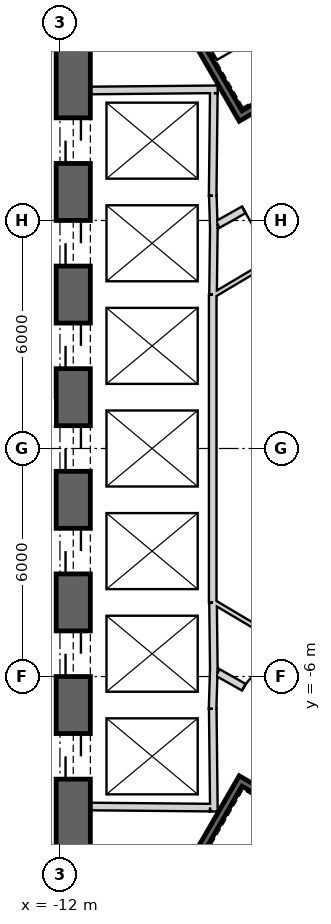
"""IFC4 building model, lengths in metres.
Left out: names, types, materials, properties, quantities, classifications, styles, units other than length and angle.
Written with IfcOpenShell. Run it as: python <this file> out.ifc"""

import sys

from ifc_helpers import new_model, si_unit, direction, frame, frame_2d, origin, place, context, subcontext, project, spatial, rectangle, extrude, element, fill, save


model = new_model("IFC4")
c1 = context("Model", 3, precision=1e-05, world=origin(), true_north=direction((0.0, 1.0)))
c2 = subcontext(c1, "Body", "Model", "MODEL_VIEW")
j1 = project(units=[si_unit("LENGTHUNIT", "METRE"), si_unit("PLANEANGLEUNIT", "RADIAN")], contexts=[c1])
p1 = place(None, origin())
s1 = spatial("IfcSite", under=j1, at=p1, CompositionType="ELEMENT")
p2 = place(p1, origin())
s2 = spatial("IfcBuilding", under=s1, at=p2, CompositionType="ELEMENT")
p3 = place(p2, frame((0.0, 0.0, 322.1)))
s3 = spatial("IfcBuildingStorey", under=s2, at=p3, CompositionType="ELEMENT", Elevation=322.1)
p4 = place(p3, frame((19.475, 2.208, 0.0), z_axis=(0.0, 0.0, 1.0), x_axis=(-0.866028369851, 0.499994862586, 0.0)))
e1 = element("IfcWall", 1, at=p4, inside=s3, PredefinedType="SHEAR", context=c2, shape_type="SweptSolid", body=[
    extrude(rectangle(XDim=31.523, YDim=0.9, at=frame_2d((15.762, 0.0))), origin(), (0.0, 0.0, 1.0), 3.9),
])
p5 = place(p4, frame((7.062, 0.0, 0.0)))
e2 = element("IfcOpeningElement", 2, at=p5, cuts=e1, PredefinedType="OPENING", context=c2, shape_type="SweptSolid", body=[
    extrude(rectangle(XDim=1.2, YDim=2.4, at=frame_2d((0.6, 1.2))), frame((0.0, 0.46, 0.0), z_axis=(0.0, -1.0, 0.0), x_axis=(1.0, 0.0, 0.0)), (0.0, 0.0, 1.0), 0.92),
])
p6 = place(p4, frame((3.612, 0.0, 0.0)))
e3 = element("IfcOpeningElement", 3, at=p6, cuts=e1, PredefinedType="OPENING", context=c2, shape_type="SweptSolid", body=[
    extrude(rectangle(XDim=1.2, YDim=2.4, at=frame_2d((0.6, 1.2))), frame((0.0, 0.46, 0.0), z_axis=(0.0, -1.0, 0.0), x_axis=(1.0, 0.0, 0.0)), (0.0, 0.0, 1.0), 0.92),
])
p7 = place(p4, frame((26.712, 0.0, 0.0)))
e4 = element("IfcOpeningElement", 4, at=p7, cuts=e1, PredefinedType="OPENING", context=c2, shape_type="SweptSolid", body=[
    extrude(rectangle(XDim=1.2, YDim=2.4, at=frame_2d((0.6, 1.2))), frame((0.0, 0.46, 0.0), z_axis=(0.0, -1.0, 0.0), x_axis=(1.0, 0.0, 0.0)), (0.0, 0.0, 1.0), 0.92),
])
p8 = place(p3, frame((-11.65, 15.762, 0.0), z_axis=(0.0, 0.0, 1.0), x_axis=(0.0, -1.0, 0.0)))
e5 = element("IfcWall", 5, at=p8, inside=s3, PredefinedType="SHEAR", context=c2, shape_type="SweptSolid", body=[
    extrude(rectangle(XDim=31.523, YDim=0.9, at=frame_2d((15.762, 0.0))), origin(), (0.0, 0.0, 1.0), 3.9),
])
p9 = place(p8, frame((7.062, 0.0, 0.0)))
e6 = element("IfcOpeningElement", 6, at=p9, cuts=e5, PredefinedType="OPENING", context=c2, shape_type="SweptSolid", body=[
    extrude(rectangle(XDim=1.2, YDim=2.4, at=frame_2d((0.6, 1.2))), frame((0.0, 0.46, 0.0), z_axis=(0.0, -1.0, 0.0), x_axis=(1.0, 0.0, 0.0)), (0.0, 0.0, 1.0), 0.92),
])
p10 = place(p8, frame((9.762, 0.0, 0.0)))
e7 = element("IfcOpeningElement", 7, at=p10, cuts=e5, PredefinedType="OPENING", context=c2, shape_type="SweptSolid", body=[
    extrude(rectangle(XDim=1.2, YDim=2.4, at=frame_2d((0.6, 1.2))), frame((0.0, 0.46, 0.0), z_axis=(0.0, -1.0, 0.0), x_axis=(1.0, 0.0, 0.0)), (0.0, 0.0, 1.0), 0.92),
])
p11 = place(p8, frame((12.462, 0.0, 0.0)))
e8 = element("IfcOpeningElement", 8, at=p11, cuts=e5, PredefinedType="OPENING", context=c2, shape_type="SweptSolid", body=[
    extrude(rectangle(XDim=1.2, YDim=2.4, at=frame_2d((0.6, 1.2))), frame((0.0, 0.46, 0.0), z_axis=(0.0, -1.0, 0.0), x_axis=(1.0, 0.0, 0.0)), (0.0, 0.0, 1.0), 0.92),
])
p12 = place(p8, frame((15.162, 0.0, 0.0)))
e9 = element("IfcOpeningElement", 9, at=p12, cuts=e5, PredefinedType="OPENING", context=c2, shape_type="SweptSolid", body=[
    extrude(rectangle(XDim=1.2, YDim=2.4, at=frame_2d((0.6, 1.2))), frame((0.0, 0.46, 0.0), z_axis=(0.0, -1.0, 0.0), x_axis=(1.0, 0.0, 0.0)), (0.0, 0.0, 1.0), 0.92),
])
p13 = place(p8, frame((17.862, 0.0, 0.0)))
e10 = element("IfcOpeningElement", 10, at=p13, cuts=e5, PredefinedType="OPENING", context=c2, shape_type="SweptSolid", body=[
    extrude(rectangle(XDim=1.2, YDim=2.4, at=frame_2d((0.6, 1.2))), frame((0.0, 0.46, 0.0), z_axis=(0.0, -1.0, 0.0), x_axis=(1.0, 0.0, 0.0)), (0.0, 0.0, 1.0), 0.92),
])
p14 = place(p8, frame((20.562, 0.0, 0.0)))
e11 = element("IfcOpeningElement", 11, at=p14, cuts=e5, PredefinedType="OPENING", context=c2, shape_type="SweptSolid", body=[
    extrude(rectangle(XDim=1.2, YDim=2.4, at=frame_2d((0.6, 1.2))), frame((0.0, 0.46, 0.0), z_axis=(0.0, -1.0, 0.0), x_axis=(1.0, 0.0, 0.0)), (0.0, 0.0, 1.0), 0.92),
])
p15 = place(p8, frame((23.262, 0.0, 0.0)))
e12 = element("IfcOpeningElement", 12, at=p15, cuts=e5, PredefinedType="OPENING", context=c2, shape_type="SweptSolid", body=[
    extrude(rectangle(XDim=1.2, YDim=2.4, at=frame_2d((0.6, 1.2))), frame((0.0, 0.46, 0.0), z_axis=(0.0, -1.0, 0.0), x_axis=(1.0, 0.0, 0.0)), (0.0, 0.0, 1.0), 0.92),
])
p16 = place(p8, frame((3.612, 0.0, 0.0)))
e13 = element("IfcOpeningElement", 13, at=p16, cuts=e5, PredefinedType="OPENING", context=c2, shape_type="SweptSolid", body=[
    extrude(rectangle(XDim=1.2, YDim=2.4, at=frame_2d((0.6, 1.2))), frame((0.0, 0.46, 0.0), z_axis=(0.0, -1.0, 0.0), x_axis=(1.0, 0.0, 0.0)), (0.0, 0.0, 1.0), 0.92),
])
p17 = place(p8, frame((26.712, 0.0, 0.0)))
e14 = element("IfcOpeningElement", 14, at=p17, cuts=e5, PredefinedType="OPENING", context=c2, shape_type="SweptSolid", body=[
    extrude(rectangle(XDim=1.2, YDim=2.4, at=frame_2d((0.6, 1.2))), frame((0.0, 0.46, 0.0), z_axis=(0.0, -1.0, 0.0), x_axis=(1.0, 0.0, 0.0)), (0.0, 0.0, 1.0), 0.92),
])
p18 = place(p3, frame((-7.825, -17.97, 0.0), z_axis=(0.0, 0.0, 1.0), x_axis=(0.866028369851, 0.499994862586, 0.0)))
e15 = element("IfcWall", 15, at=p18, inside=s3, PredefinedType="SHEAR", context=c2, shape_type="SweptSolid", body=[
    extrude(rectangle(XDim=31.523, YDim=0.9, at=frame_2d((15.762, 0.0))), origin(), (0.0, 0.0, 1.0), 3.9),
])
p19 = place(p18, frame((17.862, 0.0, 0.0)))
e16 = element("IfcOpeningElement", 16, at=p19, cuts=e15, PredefinedType="OPENING", context=c2, shape_type="SweptSolid", body=[
    extrude(rectangle(XDim=1.2, YDim=2.4, at=frame_2d((0.6, 1.2))), frame((0.0, 0.46, 0.0), z_axis=(0.0, -1.0, 0.0), x_axis=(1.0, 0.0, 0.0)), (0.0, 0.0, 1.0), 0.92),
])
p20 = place(p18, frame((20.562, 0.0, 0.0)))
e17 = element("IfcOpeningElement", 17, at=p20, cuts=e15, PredefinedType="OPENING", context=c2, shape_type="SweptSolid", body=[
    extrude(rectangle(XDim=1.2, YDim=2.4, at=frame_2d((0.6, 1.2))), frame((0.0, 0.46, 0.0), z_axis=(0.0, -1.0, 0.0), x_axis=(1.0, 0.0, 0.0)), (0.0, 0.0, 1.0), 0.92),
])
p21 = place(p18, frame((26.712, 0.0, 0.0)))
e18 = element("IfcOpeningElement", 18, at=p21, cuts=e15, PredefinedType="OPENING", context=c2, shape_type="SweptSolid", body=[
    extrude(rectangle(XDim=1.2, YDim=2.4, at=frame_2d((0.6, 1.2))), frame((0.0, 0.46, 0.0), z_axis=(0.0, -1.0, 0.0), x_axis=(1.0, 0.0, 0.0)), (0.0, 0.0, 1.0), 0.92),
])
p22 = place(p18, frame((3.612, 0.0, 0.0)))
e19 = element("IfcOpeningElement", 19, at=p22, cuts=e15, PredefinedType="OPENING", context=c2, shape_type="SweptSolid", body=[
    extrude(rectangle(XDim=1.2, YDim=2.4, at=frame_2d((0.6, 1.2))), frame((0.0, 0.46, 0.0), z_axis=(0.0, -1.0, 0.0), x_axis=(1.0, 0.0, 0.0)), (0.0, 0.0, 1.0), 0.92),
])
p23 = place(p3, frame((-11.2, 9.42, 0.0), z_axis=(0.0, 0.0, 1.0), x_axis=(0.999957167047, 0.009255488683, 0.0)))
e20 = element("IfcWall", 20, at=p23, inside=s3, PredefinedType="PLUMBINGWALL", context=c2, shape_type="SweptSolid", body=[
    extrude(rectangle(XDim=3.35, YDim=0.2, at=frame_2d((1.675, 0.0))), origin(), (0.0, 0.0, 1.0), 3.6),
])
p24 = place(p3, frame((-7.951, 9.35, 0.0), z_axis=(0.0, 0.0, 1.0), x_axis=(-0.011120469654, -0.999938165666, 0.0)))
e21 = element("IfcWall", 21, at=p24, inside=s3, PredefinedType="PLUMBINGWALL", context=c2, shape_type="SweptSolid", body=[
    extrude(rectangle(XDim=2.7, YDim=0.2, at=frame_2d((1.35, 0.0))), origin(), (0.0, 0.0, 1.0), 3.6),
])
p25 = place(p3, frame((-7.977, 6.65, 0.0), z_axis=(0.0, 0.0, 1.0), x_axis=(0.030861509705, -0.999523670164, 0.0)))
e22 = element("IfcWall", 22, at=p25, inside=s3, PredefinedType="PLUMBINGWALL", context=c2, shape_type="SweptSolid", body=[
    extrude(rectangle(XDim=0.878, YDim=0.2, at=frame_2d((0.439, 0.0))), origin(), (0.0, 0.0, 1.0), 3.6),
])
p26 = place(p3, frame((-7.949, 5.895, 0.0), z_axis=(0.0, 0.0, 1.0), x_axis=(-0.012042535896, -0.999927486035, 0.0)))
e23 = element("IfcWall", 23, at=p26, inside=s3, PredefinedType="PLUMBINGWALL", context=c2, shape_type="SweptSolid", body=[
    extrude(rectangle(XDim=1.845, YDim=0.2, at=frame_2d((0.922, 0.0))), origin(), (0.0, 0.0, 1.0), 3.6),
])
p27 = place(p3, frame((-7.98, 4.05, 0.0), z_axis=(0.0, 0.0, 1.0), x_axis=(0.0, -1.0, 0.0)))
e24 = element("IfcWall", 24, at=p27, inside=s3, PredefinedType="PLUMBINGWALL", context=c2, shape_type="SweptSolid", body=[
    extrude(rectangle(XDim=8.1, YDim=0.2, at=frame_2d((4.05, 0.0))), origin(), (0.0, 0.0, 1.0), 3.6),
])
p28 = place(p3, frame((-7.95, -5.772, 0.0), z_axis=(0.0, 0.0, 1.0), x_axis=(-0.030803413295, -0.999525462272, 0.0)))
e25 = element("IfcWall", 25, at=p28, inside=s3, PredefinedType="PLUMBINGWALL", context=c2, shape_type="SweptSolid", body=[
    extrude(rectangle(XDim=1.078, YDim=0.2, at=frame_2d((0.539, 0.0))), origin(), (0.0, 0.0, 1.0), 3.6),
])
p29 = place(p3, frame((-7.971, -4.05, 0.0), z_axis=(0.0, 0.0, 1.0), x_axis=(0.012042535896, -0.999927486035, 0.0)))
e26 = element("IfcWall", 26, at=p29, inside=s3, PredefinedType="PLUMBINGWALL", context=c2, shape_type="SweptSolid", body=[
    extrude(rectangle(XDim=1.845, YDim=0.2, at=frame_2d((0.922, 0.0))), origin(), (0.0, 0.0, 1.0), 3.6),
])
p30 = place(p3, frame((-7.979, -6.85, 0.0), z_axis=(0.0, 0.0, 1.0), x_axis=(0.011121475088, -0.999938154483, 0.0)))
e27 = element("IfcWall", 27, at=p30, inside=s3, PredefinedType="PLUMBINGWALL", context=c2, shape_type="SweptSolid", body=[
    extrude(rectangle(XDim=2.7, YDim=0.2, at=frame_2d((1.35, 0.0))), origin(), (0.0, 0.0, 1.0), 3.6),
])
p31 = place(p3, frame((-8.05, -9.449, 0.0), z_axis=(0.0, 0.0, 1.0), x_axis=(-0.999957467379, 0.009222983926, 0.0)))
e28 = element("IfcWall", 28, at=p31, inside=s3, PredefinedType="PLUMBINGWALL", context=c2, shape_type="SweptSolid", body=[
    extrude(rectangle(XDim=3.15, YDim=0.2, at=frame_2d((1.575, 0.0))), origin(), (0.0, 0.0, 1.0), 3.6),
])
p32 = place(p3, frame((-11.245, 15.678, -0.3), z_axis=(0.0, 0.0, 1.0), x_axis=(0.499977274689, -0.866038523851, 0.0)))
e29 = element("IfcWall", 29, at=p32, inside=s3, PredefinedType="SHEAR", context=c2, shape_type="SweptSolid", body=[
    extrude(rectangle(XDim=8.1, YDim=0.2, at=frame_2d((4.05, 0.0))), origin(), (0.0, 0.0, 1.0), 3.9),
])
p33 = place(p3, frame((-7.159, 8.8, -0.3), z_axis=(0.0, 0.0, 1.0), x_axis=(0.866047807691, 0.499961193289, 0.0)))
e30 = element("IfcWall", 30, at=p33, inside=s3, PredefinedType="SHEAR", context=c2, shape_type="SweptSolid", body=[
    extrude(rectangle(XDim=3.6, YDim=0.2, at=frame_2d((1.8, 0.0))), origin(), (0.0, 0.0, 1.0), 3.9),
])
p34 = place(p33, frame((1.25, 0.0, 0.3)))
e31 = element("IfcOpeningElement", 31, at=p34, cuts=e30, PredefinedType="OPENING", context=c2, shape_type="SweptSolid", body=[
    extrude(rectangle(XDim=1.1, YDim=2.1, at=frame_2d((0.55, 1.05))), frame((0.0, 0.11, 0.0), z_axis=(0.0, -1.0, 0.0), x_axis=(1.0, 0.0, 0.0)), (0.0, 0.0, 1.0), 0.22),
])
p35 = place(p3, frame((-7.196, -8.663, -0.3), z_axis=(0.0, 0.0, 1.0), x_axis=(-0.499997992926, -0.866026562566, 0.0)))
e32 = element("IfcWall", 32, at=p35, inside=s3, PredefinedType="SHEAR", context=c2, shape_type="SweptSolid", body=[
    extrude(rectangle(XDim=7.9, YDim=0.2, at=frame_2d((3.95, 0.0))), origin(), (0.0, 0.0, 1.0), 3.9),
])
p36 = place(p3, frame((-4.041, -10.599, -0.3), z_axis=(0.0, 0.0, 1.0), x_axis=(-0.866047807691, 0.499961193289, 0.0)))
e33 = element("IfcWall", 33, at=p36, inside=s3, PredefinedType="SHEAR", context=c2, shape_type="SweptSolid", body=[
    extrude(rectangle(XDim=3.6, YDim=0.2, at=frame_2d((1.8, 0.0))), origin(), (0.0, 0.0, 1.0), 3.9),
])
p37 = place(p36, frame((1.25, 0.0, 0.3)))
e34 = element("IfcOpeningElement", 34, at=p37, cuts=e33, PredefinedType="OPENING", context=c2, shape_type="SweptSolid", body=[
    extrude(rectangle(XDim=1.1, YDim=2.1, at=frame_2d((0.55, 1.05))), frame((0.0, 0.11, 0.0), z_axis=(0.0, -1.0, 0.0), x_axis=(1.0, 0.0, 0.0)), (0.0, 0.0, 1.0), 0.22),
])
p38 = place(p3, frame((-5.6, 7.16, 0.0), z_axis=(0.0, 0.0, 1.0), x_axis=(-0.871363259478, -0.490638431059, 0.0)))
e35 = element("IfcWall", 35, at=p38, inside=s3, PredefinedType="PARTITIONING", context=c2, shape_type="SweptSolid", body=[
    extrude(rectangle(XDim=2.581, YDim=0.2, at=frame_2d((1.291, 0.0))), origin(), (0.0, 0.0, 1.0), 3.6),
])
p39 = place(p38, frame((0.791, 0.0, 0.0)))
e36 = element("IfcOpeningElement", 36, at=p39, cuts=e35, PredefinedType="OPENING", context=c2, shape_type="SweptSolid", body=[
    extrude(rectangle(XDim=1.0, YDim=2.1, at=frame_2d((0.5, 1.05))), frame((0.0, 0.11, 0.0), z_axis=(0.0, -1.0, 0.0), x_axis=(1.0, 0.0, 0.0)), (0.0, 0.0, 1.0), 0.22),
])
p40 = place(p3, frame((-7.849, -5.894, 0.0), z_axis=(0.0, 0.0, 1.0), x_axis=(0.871363259478, -0.490638431059, 0.0)))
e37 = element("IfcWall", 37, at=p40, inside=s3, PredefinedType="PARTITIONING", context=c2, shape_type="SweptSolid", body=[
    extrude(rectangle(XDim=2.581, YDim=0.2, at=frame_2d((1.291, 0.0))), origin(), (0.0, 0.0, 1.0), 3.6),
])
p41 = place(p40, frame((0.791, 0.0, 0.0)))
e38 = element("IfcOpeningElement", 38, at=p41, cuts=e37, PredefinedType="OPENING", context=c2, shape_type="SweptSolid", body=[
    extrude(rectangle(XDim=1.0, YDim=2.1, at=frame_2d((0.5, 1.05))), frame((0.0, 0.11, 0.0), z_axis=(0.0, -1.0, 0.0), x_axis=(1.0, 0.0, 0.0)), (0.0, 0.0, 1.0), 0.22),
])
p42 = place(p3, frame((-6.037, 5.176, 0.0), z_axis=(0.0, 0.0, 1.0), x_axis=(-0.860106072674, -0.510115225953, 0.0)))
e39 = element("IfcWall", 39, at=p42, inside=s3, PredefinedType="PARTITIONING", context=c2, shape_type="SweptSolid", body=[
    extrude(rectangle(XDim=2.225, YDim=0.12, at=frame_2d((1.112, 0.0))), origin(), (0.0, 0.0, 1.0), 3.6),
])
p43 = place(p3, frame((-7.95, -4.041, 0.0), z_axis=(0.0, 0.0, 1.0), x_axis=(0.860112457103, -0.510104461004, 0.0)))
e40 = element("IfcWall", 40, at=p43, inside=s3, PredefinedType="PARTITIONING", context=c2, shape_type="SweptSolid", body=[
    extrude(rectangle(XDim=2.104, YDim=0.12, at=frame_2d((1.052, 0.0))), origin(), (0.0, 0.0, 1.0), 3.6),
])
p44 = place(p39, origin())
e41 = element("IfcDoor", 41, at=p44, inside=s3, OperationType="SINGLE_SWING_LEFT", PredefinedType="USERDEFINED", context=c2, shape_type="SweptSolid", body=[
    extrude(rectangle(XDim=1.0, YDim=2.1, at=frame_2d((0.5, 1.05))), frame((0.0, 0.025, 0.0), z_axis=(0.0, -1.0, 0.0), x_axis=(1.0, 0.0, 0.0)), (0.0, 0.0, 1.0), 0.05),
])
fill(e36, e41)
p45 = place(p41, origin())
e42 = element("IfcDoor", 42, at=p45, inside=s3, OperationType="SINGLE_SWING_RIGHT", PredefinedType="USERDEFINED", context=c2, shape_type="SweptSolid", body=[
    extrude(rectangle(XDim=1.0, YDim=2.1, at=frame_2d((0.5, 1.05))), frame((0.0, 0.025, 0.0), z_axis=(0.0, -1.0, 0.0), x_axis=(1.0, 0.0, 0.0)), (0.0, 0.0, 1.0), 0.05),
])
fill(e38, e42)
p46 = place(p9, origin())
e43 = element("IfcDoor", 43, at=p46, inside=s3, OperationType="SLIDING_TO_LEFT", PredefinedType="USERDEFINED", context=c2, shape_type="SweptSolid", body=[
    extrude(rectangle(XDim=1.2, YDim=2.4, at=frame_2d((0.6, 1.2))), frame((0.0, 0.025, 0.0), z_axis=(0.0, -1.0, 0.0), x_axis=(1.0, 0.0, 0.0)), (0.0, 0.0, 1.0), 0.05),
])
fill(e6, e43)
p47 = place(p10, origin())
e44 = element("IfcDoor", 44, at=p47, inside=s3, OperationType="SLIDING_TO_LEFT", PredefinedType="USERDEFINED", context=c2, shape_type="SweptSolid", body=[
    extrude(rectangle(XDim=1.2, YDim=2.4, at=frame_2d((0.6, 1.2))), frame((0.0, 0.025, 0.0), z_axis=(0.0, -1.0, 0.0), x_axis=(1.0, 0.0, 0.0)), (0.0, 0.0, 1.0), 0.05),
])
fill(e7, e44)
p48 = place(p11, origin())
e45 = element("IfcDoor", 45, at=p48, inside=s3, OperationType="SLIDING_TO_LEFT", PredefinedType="USERDEFINED", context=c2, shape_type="SweptSolid", body=[
    extrude(rectangle(XDim=1.2, YDim=2.4, at=frame_2d((0.6, 1.2))), frame((0.0, 0.025, 0.0), z_axis=(0.0, -1.0, 0.0), x_axis=(1.0, 0.0, 0.0)), (0.0, 0.0, 1.0), 0.05),
])
fill(e8, e45)
p49 = place(p12, origin())
e46 = element("IfcDoor", 46, at=p49, inside=s3, OperationType="SLIDING_TO_LEFT", PredefinedType="USERDEFINED", context=c2, shape_type="SweptSolid", body=[
    extrude(rectangle(XDim=1.2, YDim=2.4, at=frame_2d((0.6, 1.2))), frame((0.0, 0.025, 0.0), z_axis=(0.0, -1.0, 0.0), x_axis=(1.0, 0.0, 0.0)), (0.0, 0.0, 1.0), 0.05),
])
fill(e9, e46)
p50 = place(p13, origin())
e47 = element("IfcDoor", 47, at=p50, inside=s3, OperationType="SLIDING_TO_LEFT", PredefinedType="USERDEFINED", context=c2, shape_type="SweptSolid", body=[
    extrude(rectangle(XDim=1.2, YDim=2.4, at=frame_2d((0.6, 1.2))), frame((0.0, 0.025, 0.0), z_axis=(0.0, -1.0, 0.0), x_axis=(1.0, 0.0, 0.0)), (0.0, 0.0, 1.0), 0.05),
])
fill(e10, e47)
p51 = place(p14, origin())
e48 = element("IfcDoor", 48, at=p51, inside=s3, OperationType="SLIDING_TO_LEFT", PredefinedType="USERDEFINED", context=c2, shape_type="SweptSolid", body=[
    extrude(rectangle(XDim=1.2, YDim=2.4, at=frame_2d((0.6, 1.2))), frame((0.0, 0.025, 0.0), z_axis=(0.0, -1.0, 0.0), x_axis=(1.0, 0.0, 0.0)), (0.0, 0.0, 1.0), 0.05),
])
fill(e11, e48)
p52 = place(p15, origin())
e49 = element("IfcDoor", 49, at=p52, inside=s3, OperationType="SLIDING_TO_LEFT", PredefinedType="USERDEFINED", context=c2, shape_type="SweptSolid", body=[
    extrude(rectangle(XDim=1.2, YDim=2.4, at=frame_2d((0.6, 1.2))), frame((0.0, 0.025, 0.0), z_axis=(0.0, -1.0, 0.0), x_axis=(1.0, 0.0, 0.0)), (0.0, 0.0, 1.0), 0.05),
])
fill(e12, e49)
save(model, sys.argv[1])
